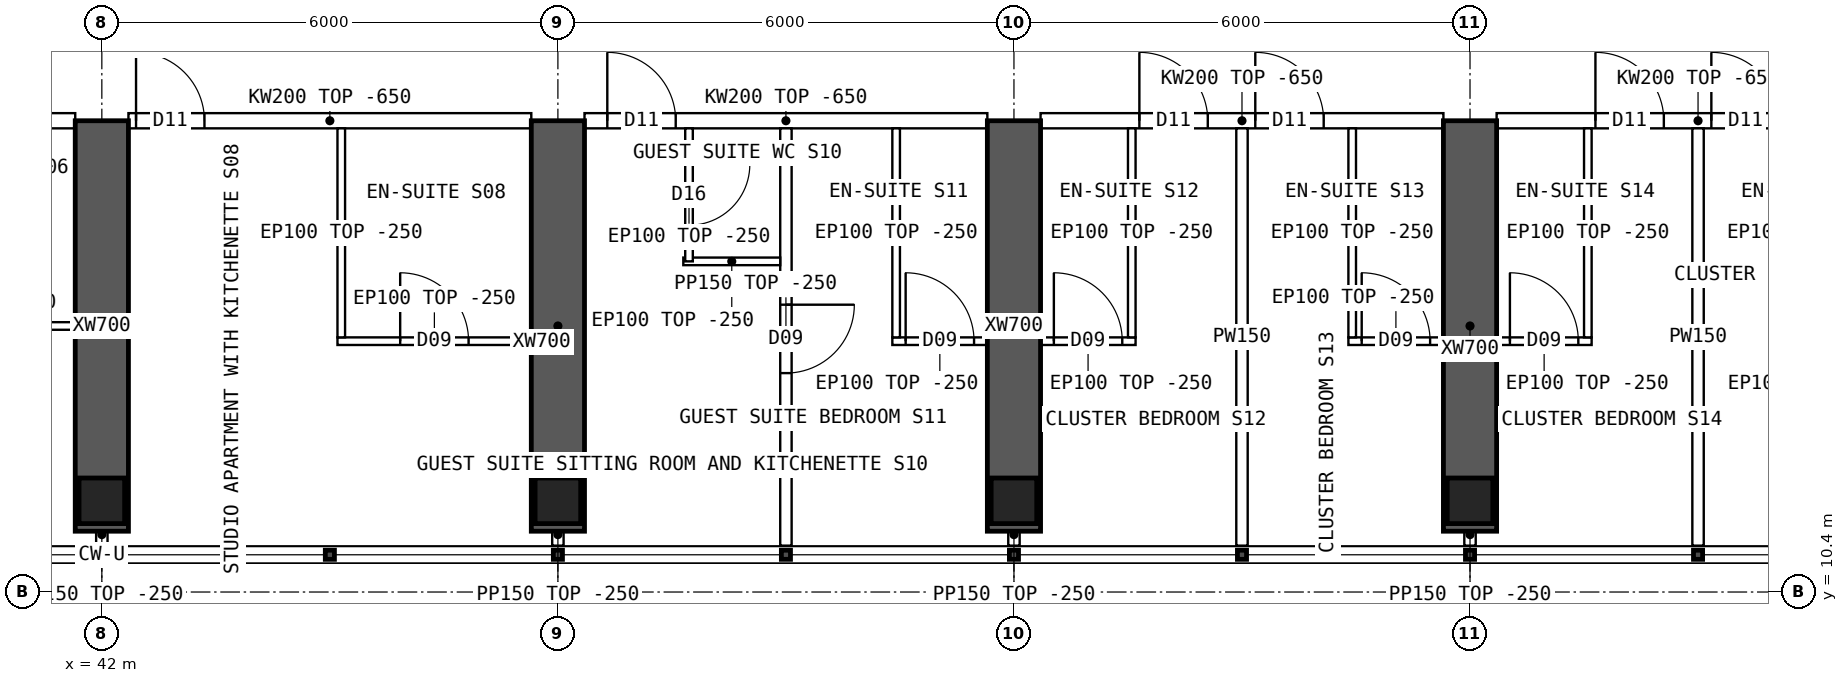
"""IFC4 building model, lengths in metres.
Left out: names, types, materials, properties, quantities, classifications, styles, units other than length and angle.
Written with IfcOpenShell. Run it as: python <this file> out.ifc"""

import sys

from ifc_helpers import new_model, si_unit, direction, frame, frame_2d, origin, origin_2d, place, context, subcontext, project, spatial, polyline, rectangle, hollow_rectangle, outline, extrude, element, fill, save


model = new_model("IFC4")
c1 = context("Model", 3, precision=1e-05, world=origin(), true_north=direction((0.0, 1.0)))
c2 = subcontext(c1, "Body", "Model", "MODEL_VIEW")
j1 = project(units=[si_unit("LENGTHUNIT", "METRE"), si_unit("PLANEANGLEUNIT", "RADIAN")], contexts=[c1])
p1 = place(None, origin())
s1 = spatial("IfcSite", under=j1, at=p1, CompositionType="ELEMENT")
p2 = place(p1, origin())
s2 = spatial("IfcBuilding", under=s1, at=p2, CompositionType="ELEMENT")
p3 = place(p2, frame((0.0, 0.0, 235.3)))
s3 = spatial("IfcBuildingStorey", under=s2, at=p3, CompositionType="ELEMENT", Elevation=235.3)
for number, where, z_axis, x_axis in (
    (1, (42.0, 11.6, 0.0), (0.0, 0.0, 1.0), (1.0, 0.0, 0.0)),
    (2, (48.0, 11.6, 0.0), (0.0, 0.0, 1.0), (1.0, 0.0, 0.0)),
    (3, (54.0, 11.6, 0.0), (0.0, 0.0, 1.0), (1.0, 0.0, 0.0)),
    (4, (60.0, 11.6, 0.0), (0.0, 0.0, 1.0), (1.0, 0.0, 0.0)),
):
    element("IfcColumn", number, at=place(p3, frame(where, z_axis=z_axis, x_axis=x_axis)), inside=s3, PredefinedType="COLUMN", context=c2, shape_type="SweptSolid", body=[
        extrude(hollow_rectangle(XDim=0.6, YDim=0.6, WallThickness=0.06, at=origin_2d()), origin(), (0.0, 0.0, 1.0), 3.75),
    ])
for number, where, z_axis, x_axis in (
    (5, (42.0, 11.2, 0.0), (0.0, 0.0, 1.0), (0.0, 1.0, 0.0)),
    (6, (48.0, 11.2, 0.0), (0.0, 0.0, 1.0), (0.0, 1.0, 0.0)),
    (7, (54.0, 11.2, 0.0), (0.0, 0.0, 1.0), (0.0, 1.0, 0.0)),
    (8, (60.0, 11.2, 0.0), (0.0, 0.0, 1.0), (0.0, 1.0, 0.0)),
):
    element("IfcWall", number, at=place(p3, frame(where, z_axis=z_axis, x_axis=x_axis)), inside=s3, PredefinedType="SHEAR", context=c2, shape_type="SweptSolid", body=[
        extrude(rectangle(XDim=5.4, YDim=0.7, at=frame_2d((2.7, 0.0))), origin(), (0.0, 0.0, 1.0), 3.75),
    ])
p4 = place(p3, frame((36.35, 16.6, 0.0), z_axis=(0.0, 0.0, 1.0), x_axis=(1.0, 0.0, 0.0)))
e9 = element("IfcWall", 9, at=p4, inside=s3, PredefinedType="SOLIDWALL", context=c2, shape_type="SweptSolid", body=[
    extrude(outline(polyline([(0.0, 0.0), (5.3, 0.0), (5.3, 3.1), (0.0, 3.1), (0.0, 0.0)])), frame((0.0, 0.1, 0.0), z_axis=(0.0, -1.0, 0.0), x_axis=(1.0, 0.0, 0.0)), (0.0, 0.0, 1.0), 0.2),
])
p5 = place(p4, frame((0.3, 0.0, 0.0)))
e10 = element("IfcOpeningElement", 10, at=p5, cuts=e9, PredefinedType="OPENING", context=c2, shape_type="SweptSolid", body=[
    extrude(rectangle(XDim=1.0, YDim=2.1, at=frame_2d((0.5, 1.05))), frame((0.0, 0.11, 0.0), z_axis=(0.0, -1.0, 0.0), x_axis=(1.0, 0.0, 0.0)), (0.0, 0.0, 1.0), 0.22),
])
p6 = place(p3, frame((42.35, 16.6, 0.0), z_axis=(0.0, 0.0, 1.0), x_axis=(1.0, 0.0, 0.0)))
e11 = element("IfcWall", 11, at=p6, inside=s3, PredefinedType="SOLIDWALL", context=c2, shape_type="SweptSolid", body=[
    extrude(outline(polyline([(0.0, 0.0), (5.3, 0.0), (5.3, 3.1), (0.0, 3.1), (0.0, 0.0)])), frame((0.0, 0.1, 0.0), z_axis=(0.0, -1.0, 0.0), x_axis=(1.0, 0.0, 0.0)), (0.0, 0.0, 1.0), 0.2),
])
p7 = place(p6, frame((0.1, 0.0, 0.0)))
e12 = element("IfcOpeningElement", 12, at=p7, cuts=e11, PredefinedType="OPENING", context=c2, shape_type="SweptSolid", body=[
    extrude(rectangle(XDim=0.9, YDim=2.1, at=frame_2d((0.45, 1.05))), frame((0.0, 0.11, 0.0), z_axis=(0.0, -1.0, 0.0), x_axis=(1.0, 0.0, 0.0)), (0.0, 0.0, 1.0), 0.22),
])
p8 = place(p3, frame((48.35, 16.6, 0.0), z_axis=(0.0, 0.0, 1.0), x_axis=(1.0, 0.0, 0.0)))
e13 = element("IfcWall", 13, at=p8, inside=s3, PredefinedType="SOLIDWALL", context=c2, shape_type="SweptSolid", body=[
    extrude(outline(polyline([(0.0, 0.0), (5.3, 0.0), (5.3, 3.1), (0.0, 3.1), (0.0, 0.0)])), frame((0.0, 0.1, 0.0), z_axis=(0.0, -1.0, 0.0), x_axis=(1.0, 0.0, 0.0)), (0.0, 0.0, 1.0), 0.2),
])
p9 = place(p8, frame((0.3, 0.0, 0.0)))
e14 = element("IfcOpeningElement", 14, at=p9, cuts=e13, PredefinedType="OPENING", context=c2, shape_type="SweptSolid", body=[
    extrude(rectangle(XDim=0.9, YDim=2.1, at=frame_2d((0.45, 1.05))), frame((0.0, 0.11, 0.0), z_axis=(0.0, -1.0, 0.0), x_axis=(1.0, 0.0, 0.0)), (0.0, 0.0, 1.0), 0.22),
])
p10 = place(p3, frame((54.35, 16.6, 0.0), z_axis=(0.0, 0.0, 1.0), x_axis=(1.0, 0.0, 0.0)))
e15 = element("IfcWall", 15, at=p10, inside=s3, PredefinedType="SOLIDWALL", context=c2, shape_type="SweptSolid", body=[
    extrude(outline(polyline([(0.0, 0.0), (5.3, 0.0), (5.3, 3.1), (0.0, 3.1), (0.0, 0.0)])), frame((0.0, 0.1, 0.0), z_axis=(0.0, -1.0, 0.0), x_axis=(1.0, 0.0, 0.0)), (0.0, 0.0, 1.0), 0.2),
])
p11 = place(p10, frame((1.3, 0.0, 0.0)))
e16 = element("IfcOpeningElement", 16, at=p11, cuts=e15, PredefinedType="OPENING", context=c2, shape_type="SweptSolid", body=[
    extrude(rectangle(XDim=0.9, YDim=2.1, at=frame_2d((0.45, 1.05))), frame((0.0, 0.11, 0.0), z_axis=(0.0, -1.0, 0.0), x_axis=(1.0, 0.0, 0.0)), (0.0, 0.0, 1.0), 0.22),
])
p12 = place(p10, frame((2.825, 0.0, 0.0)))
e17 = element("IfcOpeningElement", 17, at=p12, cuts=e15, PredefinedType="OPENING", context=c2, shape_type="SweptSolid", body=[
    extrude(rectangle(XDim=0.9, YDim=2.1, at=frame_2d((0.45, 1.05))), frame((0.0, 0.11, 0.0), z_axis=(0.0, -1.0, 0.0), x_axis=(1.0, 0.0, 0.0)), (0.0, 0.0, 1.0), 0.22),
])
p13 = place(p3, frame((60.35, 16.6, 0.0), z_axis=(0.0, 0.0, 1.0), x_axis=(1.0, 0.0, 0.0)))
e18 = element("IfcWall", 18, at=p13, inside=s3, PredefinedType="SOLIDWALL", context=c2, shape_type="SweptSolid", body=[
    extrude(outline(polyline([(0.0, 0.0), (5.3, 0.0), (5.3, 3.1), (0.0, 3.1), (0.0, 0.0)])), frame((0.0, 0.1, 0.0), z_axis=(0.0, -1.0, 0.0), x_axis=(1.0, 0.0, 0.0)), (0.0, 0.0, 1.0), 0.2),
])
p14 = place(p13, frame((1.3, 0.0, 0.0)))
e19 = element("IfcOpeningElement", 19, at=p14, cuts=e18, PredefinedType="OPENING", context=c2, shape_type="SweptSolid", body=[
    extrude(rectangle(XDim=0.9, YDim=2.1, at=frame_2d((0.45, 1.05))), frame((0.0, 0.11, 0.0), z_axis=(0.0, -1.0, 0.0), x_axis=(1.0, 0.0, 0.0)), (0.0, 0.0, 1.0), 0.22),
])
p15 = place(p13, frame((2.825, 0.0, 0.0)))
e20 = element("IfcOpeningElement", 20, at=p15, cuts=e18, PredefinedType="OPENING", context=c2, shape_type="SweptSolid", body=[
    extrude(rectangle(XDim=0.9, YDim=2.1, at=frame_2d((0.45, 1.05))), frame((0.0, 0.11, 0.0), z_axis=(0.0, -1.0, 0.0), x_axis=(1.0, 0.0, 0.0)), (0.0, 0.0, 1.0), 0.22),
])
p16 = place(p3, frame((39.0, 13.9, 0.0), z_axis=(0.0, 0.0, 1.0), x_axis=(1.0, 0.0, 0.0)))
e21 = element("IfcWall", 21, at=p16, inside=s3, PredefinedType="PARTITIONING", context=c2, shape_type="SweptSolid", body=[
    extrude(rectangle(XDim=2.65, YDim=0.1, at=frame_2d((1.325, 0.0))), origin(), (0.0, 0.0, 1.0), 3.5),
])
p17 = place(p3, frame((47.65, 13.7, 0.0), z_axis=(0.0, 0.0, 1.0), x_axis=(-1.0, 0.0, 0.0)))
e22 = element("IfcWall", 22, at=p17, inside=s3, PredefinedType="PARTITIONING", context=c2, shape_type="SweptSolid", body=[
    extrude(rectangle(XDim=2.55, YDim=0.1, at=frame_2d((1.275, 0.0))), origin(), (0.0, 0.0, 1.0), 3.5),
])
p18 = place(p17, frame((0.825, 0.0, 0.0)))
e23 = element("IfcOpeningElement", 23, at=p18, cuts=e22, PredefinedType="OPENING", context=c2, shape_type="SweptSolid", body=[
    extrude(rectangle(XDim=0.9, YDim=2.1, at=frame_2d((0.45, 1.05))), frame((0.0, 0.06, 0.0), z_axis=(0.0, -1.0, 0.0), x_axis=(1.0, 0.0, 0.0)), (0.0, 0.0, 1.0), 0.12),
])
p19 = place(p3, frame((45.15, 13.75, 0.0), z_axis=(0.0, 0.0, 1.0), x_axis=(0.0, 1.0, 0.0)))
e24 = element("IfcWall", 24, at=p19, inside=s3, PredefinedType="PARTITIONING", context=c2, shape_type="SweptSolid", body=[
    extrude(outline(polyline([(0.0, 0.0), (2.75, 0.0), (2.75, 3.1), (2.702, 3.1), (2.7, 3.5), (0.0, 3.5), (0.0, 0.0)])), frame((0.0, 0.05, 0.0), z_axis=(0.0, -1.0, 0.0), x_axis=(1.0, 0.0, 0.0)), (0.0, 0.0, 1.0), 0.1),
])
p20 = place(p3, frame((51.0, 11.01, 0.0), z_axis=(0.0, 0.0, 1.0), x_axis=(0.0, 1.0, 0.0)))
e25 = element("IfcWall", 25, at=p20, inside=s3, PredefinedType="PARTITIONING", context=c2, shape_type="SweptSolid", body=[
    extrude(outline(polyline([(0.0, 0.0), (5.49, 0.0), (5.49, 3.1), (5.442, 3.1), (5.44, 3.5), (0.792, 3.5), (0.79, 3.1), (0.392, 3.1), (0.39, 3.5), (0.0, 3.5), (0.0, 0.0)])), frame((0.0, 0.075, 0.0), z_axis=(0.0, -1.0, 0.0), x_axis=(1.0, 0.0, 0.0)), (0.0, 0.0, 1.0), 0.15),
])
p21 = place(p20, frame((2.27, 0.0, 0.0)))
e26 = element("IfcOpeningElement", 26, at=p21, cuts=e25, PredefinedType="OPENING", context=c2, shape_type="SweptSolid", body=[
    extrude(rectangle(XDim=0.9, YDim=2.1, at=frame_2d((0.45, 1.05))), frame((0.0, 0.085, 0.0), z_axis=(0.0, -1.0, 0.0), x_axis=(1.0, 0.0, 0.0)), (0.0, 0.0, 1.0), 0.17),
])
p22 = place(p3, frame((53.65, 13.7, 0.0), z_axis=(0.0, 0.0, 1.0), x_axis=(-1.0, 0.0, 0.0)))
e27 = element("IfcWall", 27, at=p22, inside=s3, PredefinedType="PARTITIONING", context=c2, shape_type="SweptSolid", body=[
    extrude(rectangle(XDim=1.25, YDim=0.1, at=frame_2d((0.625, 0.0))), origin(), (0.0, 0.0, 1.0), 3.5),
])
p23 = place(p22, frame((0.175, 0.0, 0.0)))
e28 = element("IfcOpeningElement", 28, at=p23, cuts=e27, PredefinedType="OPENING", context=c2, shape_type="SweptSolid", body=[
    extrude(rectangle(XDim=0.9, YDim=2.1, at=frame_2d((0.45, 1.05))), frame((0.0, 0.06, 0.0), z_axis=(0.0, -1.0, 0.0), x_axis=(1.0, 0.0, 0.0)), (0.0, 0.0, 1.0), 0.12),
])
p24 = place(p3, frame((52.45, 13.75, 0.0), z_axis=(0.0, 0.0, 1.0), x_axis=(0.0, 1.0, 0.0)))
e29 = element("IfcWall", 29, at=p24, inside=s3, PredefinedType="PARTITIONING", context=c2, shape_type="SweptSolid", body=[
    extrude(outline(polyline([(0.0, 0.0), (2.75, 0.0), (2.75, 3.1), (2.702, 3.1), (2.7, 3.5), (0.0, 3.5), (0.0, 0.0)])), frame((0.0, 0.05, 0.0), z_axis=(0.0, -1.0, 0.0), x_axis=(1.0, 0.0, 0.0)), (0.0, 0.0, 1.0), 0.1),
])
p25 = place(p3, frame((49.65, 14.75, 0.0), z_axis=(0.0, 0.0, 1.0), x_axis=(1.0, 0.0, 0.0)))
e30 = element("IfcWall", 30, at=p25, inside=s3, PredefinedType="PARTITIONING", context=c2, shape_type="SweptSolid", body=[
    extrude(rectangle(XDim=1.275, YDim=0.1, at=frame_2d((0.638, 0.0))), origin(), (0.0, 0.0, 1.0), 3.5),
])
p26 = place(p3, frame((49.725, 14.75, 0.0), z_axis=(0.0, 0.0, 1.0), x_axis=(0.0, 1.0, 0.0)))
e31 = element("IfcWall", 31, at=p26, inside=s3, PredefinedType="PARTITIONING", context=c2, shape_type="SweptSolid", body=[
    extrude(outline(polyline([(0.0, 0.0), (1.75, 0.0), (1.75, 3.1), (1.702, 3.1), (1.7, 3.5), (0.0, 3.5), (0.0, 0.0)])), frame((0.0, 0.05, 0.0), z_axis=(0.0, -1.0, 0.0), x_axis=(1.0, 0.0, 0.0)), (0.0, 0.0, 1.0), 0.1),
])
p27 = place(p26, frame((0.475, 0.0, 0.0)))
e32 = element("IfcOpeningElement", 32, at=p27, cuts=e31, PredefinedType="OPENING", context=c2, shape_type="SweptSolid", body=[
    extrude(rectangle(XDim=0.8, YDim=2.1, at=frame_2d((0.4, 1.05))), frame((0.0, 0.06, 0.0), z_axis=(0.0, -1.0, 0.0), x_axis=(1.0, 0.0, 0.0)), (0.0, 0.0, 1.0), 0.12),
])
p28 = place(p3, frame((57.0, 11.01, 0.0), z_axis=(0.0, 0.0, 1.0), x_axis=(0.0, 1.0, 0.0)))
e33 = element("IfcWall", 33, at=p28, inside=s3, PredefinedType="PARTITIONING", context=c2, shape_type="SweptSolid", body=[
    extrude(outline(polyline([(0.0, 0.0), (5.49, 0.0), (5.49, 3.1), (5.442, 3.1), (5.44, 3.5), (0.792, 3.5), (0.79, 3.1), (0.392, 3.1), (0.39, 3.5), (0.0, 3.5), (0.0, 0.0)])), frame((0.0, 0.075, 0.0), z_axis=(0.0, -1.0, 0.0), x_axis=(1.0, 0.0, 0.0)), (0.0, 0.0, 1.0), 0.15),
])
p29 = place(p3, frame((55.6, 13.7, 0.0), z_axis=(0.0, 0.0, 1.0), x_axis=(-1.0, 0.0, 0.0)))
e34 = element("IfcWall", 34, at=p29, inside=s3, PredefinedType="PARTITIONING", context=c2, shape_type="SweptSolid", body=[
    extrude(rectangle(XDim=1.25, YDim=0.1, at=frame_2d((0.625, 0.0))), origin(), (0.0, 0.0, 1.0), 3.5),
])
p30 = place(p29, frame((0.175, 0.0, 0.0)))
e35 = element("IfcOpeningElement", 35, at=p30, cuts=e34, PredefinedType="OPENING", context=c2, shape_type="SweptSolid", body=[
    extrude(rectangle(XDim=0.9, YDim=2.1, at=frame_2d((0.45, 1.05))), frame((0.0, 0.06, 0.0), z_axis=(0.0, -1.0, 0.0), x_axis=(1.0, 0.0, 0.0)), (0.0, 0.0, 1.0), 0.12),
])
p31 = place(p3, frame((55.55, 13.75, 0.0), z_axis=(0.0, 0.0, 1.0), x_axis=(0.0, 1.0, 0.0)))
e36 = element("IfcWall", 36, at=p31, inside=s3, PredefinedType="PARTITIONING", context=c2, shape_type="SweptSolid", body=[
    extrude(outline(polyline([(0.0, 0.0), (2.75, 0.0), (2.75, 3.1), (2.702, 3.1), (2.7, 3.5), (0.0, 3.5), (0.0, 0.0)])), frame((0.0, 0.05, 0.0), z_axis=(0.0, -1.0, 0.0), x_axis=(1.0, 0.0, 0.0)), (0.0, 0.0, 1.0), 0.1),
])
p32 = place(p3, frame((59.65, 13.7, 0.0), z_axis=(0.0, 0.0, 1.0), x_axis=(-1.0, 0.0, 0.0)))
e37 = element("IfcWall", 37, at=p32, inside=s3, PredefinedType="PARTITIONING", context=c2, shape_type="SweptSolid", body=[
    extrude(rectangle(XDim=1.25, YDim=0.1, at=frame_2d((0.625, 0.0))), origin(), (0.0, 0.0, 1.0), 3.5),
])
p33 = place(p32, frame((0.175, 0.0, 0.0)))
e38 = element("IfcOpeningElement", 38, at=p33, cuts=e37, PredefinedType="OPENING", context=c2, shape_type="SweptSolid", body=[
    extrude(rectangle(XDim=0.9, YDim=2.1, at=frame_2d((0.45, 1.05))), frame((0.0, 0.06, 0.0), z_axis=(0.0, -1.0, 0.0), x_axis=(1.0, 0.0, 0.0)), (0.0, 0.0, 1.0), 0.12),
])
p34 = place(p3, frame((58.45, 13.75, 0.0), z_axis=(0.0, 0.0, 1.0), x_axis=(0.0, 1.0, 0.0)))
e39 = element("IfcWall", 39, at=p34, inside=s3, PredefinedType="PARTITIONING", context=c2, shape_type="SweptSolid", body=[
    extrude(outline(polyline([(0.0, 0.0), (2.75, 0.0), (2.75, 3.1), (2.702, 3.1), (2.7, 3.5), (0.0, 3.5), (0.0, 0.0)])), frame((0.0, 0.05, 0.0), z_axis=(0.0, -1.0, 0.0), x_axis=(1.0, 0.0, 0.0)), (0.0, 0.0, 1.0), 0.1),
])
p35 = place(p3, frame((63.0, 11.01, 0.0), z_axis=(0.0, 0.0, 1.0), x_axis=(0.0, 1.0, 0.0)))
e40 = element("IfcWall", 40, at=p35, inside=s3, PredefinedType="PARTITIONING", context=c2, shape_type="SweptSolid", body=[
    extrude(outline(polyline([(0.0, 0.0), (5.49, 0.0), (5.49, 3.1), (5.442, 3.1), (5.44, 3.5), (0.792, 3.5), (0.79, 3.1), (0.392, 3.1), (0.39, 3.5), (0.0, 3.5), (0.0, 0.0)])), frame((0.0, 0.075, 0.0), z_axis=(0.0, -1.0, 0.0), x_axis=(1.0, 0.0, 0.0)), (0.0, 0.0, 1.0), 0.15),
])
p36 = place(p3, frame((61.6, 13.7, 0.0), z_axis=(0.0, 0.0, 1.0), x_axis=(-1.0, 0.0, 0.0)))
e41 = element("IfcWall", 41, at=p36, inside=s3, PredefinedType="PARTITIONING", context=c2, shape_type="SweptSolid", body=[
    extrude(rectangle(XDim=1.25, YDim=0.1, at=frame_2d((0.625, 0.0))), origin(), (0.0, 0.0, 1.0), 3.5),
])
p37 = place(p36, frame((0.175, 0.0, 0.0)))
e42 = element("IfcOpeningElement", 42, at=p37, cuts=e41, PredefinedType="OPENING", context=c2, shape_type="SweptSolid", body=[
    extrude(rectangle(XDim=0.9, YDim=2.1, at=frame_2d((0.45, 1.05))), frame((0.0, 0.06, 0.0), z_axis=(0.0, -1.0, 0.0), x_axis=(1.0, 0.0, 0.0)), (0.0, 0.0, 1.0), 0.12),
])
p38 = place(p3, frame((61.55, 13.75, 0.0), z_axis=(0.0, 0.0, 1.0), x_axis=(0.0, 1.0, 0.0)))
e43 = element("IfcWall", 43, at=p38, inside=s3, PredefinedType="PARTITIONING", context=c2, shape_type="SweptSolid", body=[
    extrude(outline(polyline([(0.0, 0.0), (2.75, 0.0), (2.75, 3.1), (2.702, 3.1), (2.7, 3.5), (0.0, 3.5), (0.0, 0.0)])), frame((0.0, 0.05, 0.0), z_axis=(0.0, -1.0, 0.0), x_axis=(1.0, 0.0, 0.0)), (0.0, 0.0, 1.0), 0.1),
])
for number, where, z_axis, x_axis in (
    (44, (42.0, 11.3, 0.0), (0.0, 0.0, 1.0), (0.0, -1.0, 0.0)),
    (45, (48.0, 11.3, 0.0), (0.0, 0.0, 1.0), (0.0, -1.0, 0.0)),
    (46, (54.0, 11.3, 0.0), (0.0, 0.0, 1.0), (0.0, -1.0, 0.0)),
    (47, (60.0, 11.3, 0.0), (0.0, 0.0, 1.0), (0.0, -1.0, 0.0)),
):
    element("IfcWall", number, at=place(p3, frame(where, z_axis=z_axis, x_axis=x_axis)), inside=s3, PredefinedType="PARTITIONING", context=c2, shape_type="SweptSolid", body=[
        extrude(rectangle(XDim=0.29, YDim=0.15, at=frame_2d((0.145, 0.0))), origin(), (0.0, 0.0, 1.0), 3.5),
    ])
p39 = place(p18, origin())
e48 = element("IfcDoor", 48, at=p39, inside=s3, OperationType="SINGLE_SWING_RIGHT", PredefinedType="DOOR", context=c2, shape_type="SweptSolid", body=[
    extrude(rectangle(XDim=0.9, YDim=2.1, at=frame_2d((0.45, 1.05))), frame((0.0, 0.025, 0.0), z_axis=(0.0, -1.0, 0.0), x_axis=(1.0, 0.0, 0.0)), (0.0, 0.0, 1.0), 0.05),
])
fill(e23, e48)
p40 = place(p7, origin())
e49 = element("IfcDoor", 49, at=p40, inside=s3, OperationType="SINGLE_SWING_LEFT", PredefinedType="DOOR", context=c2, shape_type="SweptSolid", body=[
    extrude(rectangle(XDim=0.9, YDim=2.1, at=frame_2d((0.45, 1.05))), frame((0.0, 0.025, 0.0), z_axis=(0.0, -1.0, 0.0), x_axis=(1.0, 0.0, 0.0)), (0.0, 0.0, 1.0), 0.05),
])
fill(e12, e49)
p41 = place(p9, origin())
e50 = element("IfcDoor", 50, at=p41, inside=s3, OperationType="SINGLE_SWING_LEFT", PredefinedType="DOOR", context=c2, shape_type="SweptSolid", body=[
    extrude(rectangle(XDim=0.9, YDim=2.1, at=frame_2d((0.45, 1.05))), frame((0.0, 0.025, 0.0), z_axis=(0.0, -1.0, 0.0), x_axis=(1.0, 0.0, 0.0)), (0.0, 0.0, 1.0), 0.05),
])
fill(e14, e50)
p42 = place(p23, origin())
e51 = element("IfcDoor", 51, at=p42, inside=s3, OperationType="SINGLE_SWING_RIGHT", PredefinedType="DOOR", context=c2, shape_type="SweptSolid", body=[
    extrude(rectangle(XDim=0.9, YDim=2.1, at=frame_2d((0.45, 1.05))), frame((0.0, 0.025, 0.0), z_axis=(0.0, -1.0, 0.0), x_axis=(1.0, 0.0, 0.0)), (0.0, 0.0, 1.0), 0.05),
])
fill(e28, e51)
p43 = place(p21, origin())
e52 = element("IfcDoor", 52, at=p43, inside=s3, OperationType="SINGLE_SWING_RIGHT", PredefinedType="DOOR", context=c2, shape_type="SweptSolid", body=[
    extrude(rectangle(XDim=0.9, YDim=2.1, at=frame_2d((0.45, 1.05))), frame((0.0, 0.025, 0.0), z_axis=(0.0, -1.0, 0.0), x_axis=(1.0, 0.0, 0.0)), (0.0, 0.0, 1.0), 0.05),
])
fill(e26, e52)
p44 = place(p27, origin())
e53 = element("IfcDoor", 53, at=p44, inside=s3, OperationType="SINGLE_SWING_RIGHT", PredefinedType="DOOR", context=c2, shape_type="SweptSolid", body=[
    extrude(rectangle(XDim=0.8, YDim=2.1, at=frame_2d((0.4, 1.05))), frame((0.0, 0.025, 0.0), z_axis=(0.0, -1.0, 0.0), x_axis=(1.0, 0.0, 0.0)), (0.0, 0.0, 1.0), 0.05),
])
fill(e32, e53)
p45 = place(p30, origin())
e54 = element("IfcDoor", 54, at=p45, inside=s3, OperationType="SINGLE_SWING_RIGHT", PredefinedType="DOOR", context=c2, shape_type="SweptSolid", body=[
    extrude(rectangle(XDim=0.9, YDim=2.1, at=frame_2d((0.45, 1.05))), frame((0.0, 0.025, 0.0), z_axis=(0.0, -1.0, 0.0), x_axis=(1.0, 0.0, 0.0)), (0.0, 0.0, 1.0), 0.05),
])
fill(e35, e54)
p46 = place(p11, origin())
e55 = element("IfcDoor", 55, at=p46, inside=s3, OperationType="SINGLE_SWING_LEFT", PredefinedType="DOOR", context=c2, shape_type="SweptSolid", body=[
    extrude(rectangle(XDim=0.9, YDim=2.1, at=frame_2d((0.45, 1.05))), frame((0.0, 0.025, 0.0), z_axis=(0.0, -1.0, 0.0), x_axis=(1.0, 0.0, 0.0)), (0.0, 0.0, 1.0), 0.05),
])
fill(e16, e55)
p47 = place(p33, origin())
e56 = element("IfcDoor", 56, at=p47, inside=s3, OperationType="SINGLE_SWING_RIGHT", PredefinedType="DOOR", context=c2, shape_type="SweptSolid", body=[
    extrude(rectangle(XDim=0.9, YDim=2.1, at=frame_2d((0.45, 1.05))), frame((0.0, 0.025, 0.0), z_axis=(0.0, -1.0, 0.0), x_axis=(1.0, 0.0, 0.0)), (0.0, 0.0, 1.0), 0.05),
])
fill(e38, e56)
p48 = place(p12, origin())
e57 = element("IfcDoor", 57, at=p48, inside=s3, OperationType="SINGLE_SWING_LEFT", PredefinedType="DOOR", context=c2, shape_type="SweptSolid", body=[
    extrude(rectangle(XDim=0.9, YDim=2.1, at=frame_2d((0.45, 1.05))), frame((0.0, 0.025, 0.0), z_axis=(0.0, -1.0, 0.0), x_axis=(1.0, 0.0, 0.0)), (0.0, 0.0, 1.0), 0.05),
])
fill(e17, e57)
p49 = place(p37, origin())
e58 = element("IfcDoor", 58, at=p49, inside=s3, OperationType="SINGLE_SWING_RIGHT", PredefinedType="DOOR", context=c2, shape_type="SweptSolid", body=[
    extrude(rectangle(XDim=0.9, YDim=2.1, at=frame_2d((0.45, 1.05))), frame((0.0, 0.025, 0.0), z_axis=(0.0, -1.0, 0.0), x_axis=(1.0, 0.0, 0.0)), (0.0, 0.0, 1.0), 0.05),
])
fill(e42, e58)
p50 = place(p14, origin())
e59 = element("IfcDoor", 59, at=p50, inside=s3, OperationType="SINGLE_SWING_LEFT", PredefinedType="DOOR", context=c2, shape_type="SweptSolid", body=[
    extrude(rectangle(XDim=0.9, YDim=2.1, at=frame_2d((0.45, 1.05))), frame((0.0, 0.025, 0.0), z_axis=(0.0, -1.0, 0.0), x_axis=(1.0, 0.0, 0.0)), (0.0, 0.0, 1.0), 0.05),
])
fill(e19, e59)
p51 = place(p15, origin())
e60 = element("IfcDoor", 60, at=p51, inside=s3, OperationType="SINGLE_SWING_LEFT", PredefinedType="DOOR", context=c2, shape_type="SweptSolid", body=[
    extrude(rectangle(XDim=0.9, YDim=2.1, at=frame_2d((0.45, 1.05))), frame((0.0, 0.025, 0.0), z_axis=(0.0, -1.0, 0.0), x_axis=(1.0, 0.0, 0.0)), (0.0, 0.0, 1.0), 0.05),
])
fill(e20, e60)
save(model, sys.argv[1])
